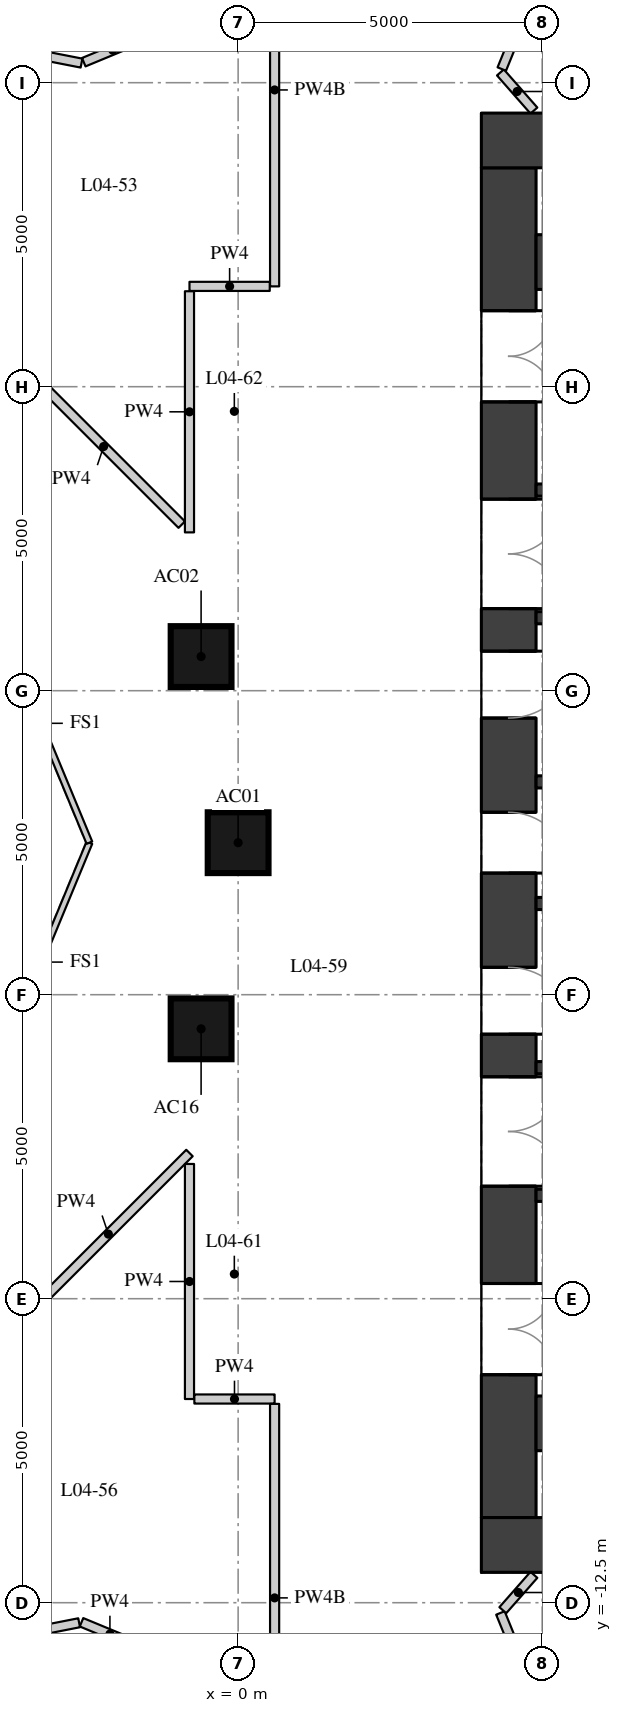
"""IFC4 building model, lengths in metres.
Left out: names, types, materials, properties, quantities, classifications, styles, units other than length and angle.
Written with IfcOpenShell. Run it as: python <this file> out.ifc"""

import sys

from ifc_helpers import new_model, si_unit, direction, frame, frame_2d, origin, origin_2d, place, context, subcontext, project, spatial, rectangle, extrude, element, fill, save


model = new_model("IFC4")
c1 = context("Model", 3, precision=1e-05, world=origin(), true_north=direction((0.0, 1.0)))
c2 = subcontext(c1, "Body", "Model", "MODEL_VIEW")
j1 = project(units=[si_unit("LENGTHUNIT", "METRE"), si_unit("PLANEANGLEUNIT", "RADIAN")], contexts=[c1])
p1 = place(None, origin())
s1 = spatial("IfcSite", under=j1, at=p1, CompositionType="ELEMENT")
p2 = place(p1, origin())
s2 = spatial("IfcBuilding", under=s1, at=p2, CompositionType="ELEMENT")
p3 = place(p2, frame((0.0, 0.0, 21.7)))
s3 = spatial("IfcBuildingStorey", under=s2, at=p3, CompositionType="ELEMENT", Elevation=21.7)
for number, where, z_axis, x_axis in (
    (1, (0.0, 0.0, 0.0), (0.0, 0.0, 1.0), (1.0, 0.0, 0.0)),
    (2, (-0.609, 3.062, 0.0), (0.0, 0.0, 1.0), (1.0, 0.0, 0.0)),
    (3, (-0.609, -3.062, 0.0), (0.0, 0.0, 1.0), (1.0, 0.0, 0.0)),
):
    element("IfcColumn", number, at=place(p3, frame(where, z_axis=z_axis, x_axis=x_axis)), inside=s3, PredefinedType="COLUMN", context=c2, shape_type="SweptSolid", body=[
        extrude(rectangle(XDim=1.0, YDim=1.0, at=origin_2d()), origin(), (0.0, 0.0, 1.0), 3.3),
    ])
p4 = place(p3, frame((4.45, -11.1, 0.0), z_axis=(0.0, 0.0, 1.0), x_axis=(0.0, 1.0, 0.0)))
e4 = element("IfcWall", 4, at=p4, inside=s3, PredefinedType="SHEAR", context=c2, shape_type="SweptSolid", body=[
    extrude(rectangle(XDim=22.2, YDim=0.9, at=frame_2d((11.1, 0.0))), origin(), (0.0, 0.0, 1.0), 3.02),
])
p5 = place(p4, frame((2.35, 0.0, 0.0)))
e5 = element("IfcOpeningElement", 5, at=p5, cuts=e4, PredefinedType="OPENING", context=c2, shape_type="SweptSolid", body=[
    extrude(rectangle(XDim=1.5, YDim=2.1, at=frame_2d((0.75, 1.05))), frame((0.0, 0.46, 0.0), z_axis=(0.0, -1.0, 0.0), x_axis=(1.0, 0.0, 0.0)), (0.0, 0.0, 1.0), 0.92),
])
p6 = place(p4, frame((5.45, 0.0, 0.0)))
e6 = element("IfcOpeningElement", 6, at=p6, cuts=e4, PredefinedType="OPENING", context=c2, shape_type="SweptSolid", body=[
    extrude(rectangle(XDim=1.8, YDim=2.1, at=frame_2d((0.9, 1.05))), frame((0.0, 0.46, 0.0), z_axis=(0.0, -1.0, 0.0), x_axis=(1.0, 0.0, 0.0)), (0.0, 0.0, 1.0), 0.92),
])
p7 = place(p4, frame((7.95, 0.0, 0.0)))
e7 = element("IfcOpeningElement", 7, at=p7, cuts=e4, PredefinedType="OPENING", context=c2, shape_type="SweptSolid", body=[
    extrude(rectangle(XDim=1.1, YDim=2.1, at=frame_2d((0.55, 1.05))), frame((0.0, 0.46, 0.0), z_axis=(0.0, -1.0, 0.0), x_axis=(1.0, 0.0, 0.0)), (0.0, 0.0, 1.0), 0.92),
])
p8 = place(p4, frame((10.6, 0.0, 0.0)))
e8 = element("IfcOpeningElement", 8, at=p8, cuts=e4, PredefinedType="OPENING", context=c2, shape_type="SweptSolid", body=[
    extrude(rectangle(XDim=1.0, YDim=2.1, at=frame_2d((0.5, 1.05))), frame((0.0, 0.46, 0.0), z_axis=(0.0, -1.0, 0.0), x_axis=(1.0, 0.0, 0.0)), (0.0, 0.0, 1.0), 0.92),
])
p9 = place(p4, frame((13.15, 0.0, 0.0)))
e9 = element("IfcOpeningElement", 9, at=p9, cuts=e4, PredefinedType="OPENING", context=c2, shape_type="SweptSolid", body=[
    extrude(rectangle(XDim=1.1, YDim=2.1, at=frame_2d((0.55, 1.05))), frame((0.0, 0.46, 0.0), z_axis=(0.0, -1.0, 0.0), x_axis=(1.0, 0.0, 0.0)), (0.0, 0.0, 1.0), 0.92),
])
p10 = place(p4, frame((14.95, 0.0, 0.0)))
e10 = element("IfcOpeningElement", 10, at=p10, cuts=e4, PredefinedType="OPENING", context=c2, shape_type="SweptSolid", body=[
    extrude(rectangle(XDim=1.8, YDim=2.1, at=frame_2d((0.9, 1.05))), frame((0.0, 0.46, 0.0), z_axis=(0.0, -1.0, 0.0), x_axis=(1.0, 0.0, 0.0)), (0.0, 0.0, 1.0), 0.92),
])
p11 = place(p4, frame((18.35, 0.0, 0.0)))
e11 = element("IfcOpeningElement", 11, at=p11, cuts=e4, PredefinedType="OPENING", context=c2, shape_type="SweptSolid", body=[
    extrude(rectangle(XDim=1.5, YDim=2.1, at=frame_2d((0.75, 1.05))), frame((0.0, 0.46, 0.0), z_axis=(0.0, -1.0, 0.0), x_axis=(1.0, 0.0, 0.0)), (0.0, 0.0, 1.0), 0.92),
])
for number, where, z_axis, x_axis in (
    (12, (4.0, 11.55, 0.0), (0.0, 0.0, 1.0), (1.0, 0.0, 0.0)),
    (13, (4.0, -11.55, 0.0), (0.0, 0.0, 1.0), (1.0, 0.0, 0.0)),
):
    element("IfcWall", number, at=place(p3, frame(where, z_axis=z_axis, x_axis=x_axis)), inside=s3, PredefinedType="SHEAR", context=c2, shape_type="SweptSolid", body=[
        extrude(rectangle(XDim=15.2, YDim=0.9, at=frame_2d((7.6, 0.0))), origin(), (0.0, 0.0, 1.0), 3.02),
    ])
for number, where, z_axis, x_axis in (
    (14, (4.9, 9.55, 0.0), (0.0, 0.0, 1.0), (1.0, 0.0, 0.0)),
    (15, (4.9, -9.55, 0.0), (0.0, 0.0, 1.0), (1.0, 0.0, 0.0)),
):
    element("IfcWall", number, at=place(p3, frame(where, z_axis=z_axis, x_axis=x_axis)), inside=s3, PredefinedType="SHEAR", context=c2, shape_type="SweptSolid", body=[
        extrude(rectangle(XDim=10.2, YDim=0.9, at=frame_2d((5.1, 0.0))), origin(), (0.0, 0.0, 1.0), 3.02),
    ])
p12 = place(p3, frame((4.9, 5.8, 0.0), z_axis=(0.0, 0.0, 1.0), x_axis=(1.0, 0.0, 0.0)))
e16 = element("IfcWall", 16, at=p12, inside=s3, PredefinedType="SHEAR", context=c2, shape_type="SweptSolid", body=[
    extrude(rectangle(XDim=10.2, YDim=0.2, at=frame_2d((5.1, 0.0))), origin(), (0.0, 0.0, 1.0), 3.02),
])
p13 = place(p12, frame((6.75, 0.0, 0.0)))
e17 = element("IfcOpeningElement", 17, at=p13, cuts=e16, PredefinedType="OPENING", context=c2, shape_type="SweptSolid", body=[
    extrude(rectangle(XDim=1.1, YDim=2.1, at=frame_2d((0.55, 1.05))), frame((0.0, 0.11, 0.0), z_axis=(0.0, -1.0, 0.0), x_axis=(1.0, 0.0, 0.0)), (0.0, 0.0, 1.0), 0.22),
])
p14 = place(p12, frame((8.75, 0.0, 0.0)))
e18 = element("IfcOpeningElement", 18, at=p14, cuts=e16, PredefinedType="OPENING", context=c2, shape_type="SweptSolid", body=[
    extrude(rectangle(XDim=1.1, YDim=2.1, at=frame_2d((0.55, 1.05))), frame((0.0, 0.11, 0.0), z_axis=(0.0, -1.0, 0.0), x_axis=(1.0, 0.0, 0.0)), (0.0, 0.0, 1.0), 0.22),
])
p15 = place(p3, frame((4.9, 3.7, 0.0), z_axis=(0.0, 0.0, 1.0), x_axis=(1.0, 0.0, 0.0)))
e19 = element("IfcWall", 19, at=p15, inside=s3, PredefinedType="SHEAR", context=c2, shape_type="SweptSolid", body=[
    extrude(rectangle(XDim=10.2, YDim=0.2, at=frame_2d((5.1, 0.0))), origin(), (0.0, 0.0, 1.0), 3.02),
])
p16 = place(p15, frame((6.3, 0.0, 0.0)))
e20 = element("IfcOpeningElement", 20, at=p16, cuts=e19, PredefinedType="OPENING", context=c2, shape_type="SweptSolid", body=[
    extrude(rectangle(XDim=1.1, YDim=2.1, at=frame_2d((0.55, 1.05))), frame((0.0, 0.11, 0.0), z_axis=(0.0, -1.0, 0.0), x_axis=(1.0, 0.0, 0.0)), (0.0, 0.0, 1.0), 0.22),
])
p17 = place(p15, frame((8.6, 0.0, 0.0)))
e21 = element("IfcOpeningElement", 21, at=p17, cuts=e19, PredefinedType="OPENING", context=c2, shape_type="SweptSolid", body=[
    extrude(rectangle(XDim=1.1, YDim=2.1, at=frame_2d((0.55, 1.05))), frame((0.0, 0.11, 0.0), z_axis=(0.0, -1.0, 0.0), x_axis=(1.0, 0.0, 0.0)), (0.0, 0.0, 1.0), 0.22),
])
for number, where, z_axis, x_axis in (
    (22, (4.9, 1.0, 0.0), (0.0, 0.0, 1.0), (1.0, 0.0, 0.0)),
    (23, (4.9, -1.0, 0.0), (0.0, 0.0, 1.0), (1.0, 0.0, 0.0)),
):
    element("IfcWall", number, at=place(p3, frame(where, z_axis=z_axis, x_axis=x_axis)), inside=s3, PredefinedType="SHEAR", context=c2, shape_type="SweptSolid", body=[
        extrude(rectangle(XDim=10.2, YDim=0.2, at=frame_2d((5.1, 0.0))), origin(), (0.0, 0.0, 1.0), 3.02),
    ])
p18 = place(p3, frame((4.9, -3.7, 0.0), z_axis=(0.0, 0.0, 1.0), x_axis=(1.0, 0.0, 0.0)))
e24 = element("IfcWall", 24, at=p18, inside=s3, PredefinedType="SHEAR", context=c2, shape_type="SweptSolid", body=[
    extrude(rectangle(XDim=10.2, YDim=0.2, at=frame_2d((5.1, 0.0))), origin(), (0.0, 0.0, 1.0), 3.02),
])
p19 = place(p18, frame((6.3, 0.0, 0.0)))
e25 = element("IfcOpeningElement", 25, at=p19, cuts=e24, PredefinedType="OPENING", context=c2, shape_type="SweptSolid", body=[
    extrude(rectangle(XDim=1.1, YDim=2.1, at=frame_2d((0.55, 1.05))), frame((0.0, 0.11, 0.0), z_axis=(0.0, -1.0, 0.0), x_axis=(1.0, 0.0, 0.0)), (0.0, 0.0, 1.0), 0.22),
])
p20 = place(p18, frame((8.6, 0.0, 0.0)))
e26 = element("IfcOpeningElement", 26, at=p20, cuts=e24, PredefinedType="OPENING", context=c2, shape_type="SweptSolid", body=[
    extrude(rectangle(XDim=1.1, YDim=2.1, at=frame_2d((0.55, 1.05))), frame((0.0, 0.11, 0.0), z_axis=(0.0, -1.0, 0.0), x_axis=(1.0, 0.0, 0.0)), (0.0, 0.0, 1.0), 0.22),
])
p21 = place(p3, frame((4.9, -5.8, 0.0), z_axis=(0.0, 0.0, 1.0), x_axis=(1.0, 0.0, 0.0)))
e27 = element("IfcWall", 27, at=p21, inside=s3, PredefinedType="SHEAR", context=c2, shape_type="SweptSolid", body=[
    extrude(rectangle(XDim=10.2, YDim=0.2, at=frame_2d((5.1, 0.0))), origin(), (0.0, 0.0, 1.0), 3.02),
])
p22 = place(p3, frame((0.6, 15.612, 0.0), z_axis=(0.0, 0.0, 1.0), x_axis=(0.0, -1.0, 0.0)))
e28 = element("IfcWall", 28, at=p22, inside=s3, PredefinedType="PARTITIONING", context=c2, shape_type="SweptSolid", body=[
    extrude(rectangle(XDim=6.462, YDim=0.15, at=frame_2d((3.231, 0.0))), origin(), (0.0, 0.0, 1.0), 2.47),
])
p23 = place(p3, frame((0.52, 9.15, 0.0), z_axis=(0.0, 0.0, 1.0), x_axis=(-1.0, 0.0, 0.0)))
e29 = element("IfcWall", 29, at=p23, inside=s3, PredefinedType="PARTITIONING", context=c2, shape_type="SweptSolid", body=[
    extrude(rectangle(XDim=1.32, YDim=0.15, at=frame_2d((0.66, 0.0))), origin(), (0.0, 0.0, 1.0), 3.02),
])
p24 = place(p3, frame((-0.8, 9.07, 0.0), z_axis=(0.0, 0.0, 1.0), x_axis=(0.0, -1.0, 0.0)))
e30 = element("IfcWall", 30, at=p24, inside=s3, PredefinedType="PARTITIONING", context=c2, shape_type="SweptSolid", body=[
    extrude(rectangle(XDim=3.966, YDim=0.15, at=frame_2d((1.983, 0.0))), origin(), (0.0, 0.0, 1.0), 3.02),
])
p25 = place(p3, frame((-0.927, 5.231, 0.0), z_axis=(0.0, 0.0, 1.0), x_axis=(-0.707106781187, 0.707106781187, 0.0)))
e31 = element("IfcWall", 31, at=p25, inside=s3, PredefinedType="PARTITIONING", context=c2, shape_type="SweptSolid", body=[
    extrude(rectangle(XDim=3.633, YDim=0.15, at=frame_2d((1.817, 0.0))), origin(), (0.0, 0.0, 1.0), 3.02),
])
p26 = place(p3, frame((-4.607, 13.22, 0.0), z_axis=(0.0, 0.0, 1.0), x_axis=(0.981304142817, -0.192463449234, 0.0)))
e32 = element("IfcWall", 32, at=p26, inside=s3, PredefinedType="PARTITIONING", context=c2, shape_type="SweptSolid", body=[
    extrude(rectangle(XDim=2.07, YDim=0.15, at=frame_2d((1.035, 0.0))), origin(), (0.0, 0.0, 1.0), 3.02),
])
p27 = place(p3, frame((-2.539, 12.837, 0.0), z_axis=(0.0, 0.0, 1.0), x_axis=(0.923768662954, 0.382950985565, 0.0)))
e33 = element("IfcWall", 33, at=p27, inside=s3, PredefinedType="PARTITIONING", context=c2, shape_type="SweptSolid", body=[
    extrude(rectangle(XDim=1.031, YDim=0.15, at=frame_2d((0.516, 0.0))), origin(), (0.0, 0.0, 1.0), 3.02),
])
p28 = place(p3, frame((4.865, 12.042, 0.0), z_axis=(0.0, 0.0, 1.0), x_axis=(-0.660014599896, 0.751252772323, 0.0)))
e34 = element("IfcWall", 34, at=p28, inside=s3, PredefinedType="PARTITIONING", context=c2, shape_type="SweptSolid", body=[
    extrude(rectangle(XDim=0.835, YDim=0.15, at=frame_2d((0.417, 0.0))), origin(), (0.0, 0.0, 1.0), 2.57),
])
p29 = place(p3, frame((4.336, 12.724, 0.0), z_axis=(0.0, 0.0, 1.0), x_axis=(0.376897652409, 0.926254910707, 0.0)))
e35 = element("IfcWall", 35, at=p29, inside=s3, PredefinedType="PARTITIONING", context=c2, shape_type="SweptSolid", body=[
    extrude(rectangle(XDim=1.962, YDim=0.15, at=frame_2d((0.981, 0.0))), origin(), (0.0, 0.0, 1.0), 3.02),
])
p30 = place(p3, frame((-1.641, -13.209, 0.0), z_axis=(0.0, 0.0, 1.0), x_axis=(-0.923725449546, 0.383055209937, 0.0)))
e36 = element("IfcWall", 36, at=p30, inside=s3, PredefinedType="PARTITIONING", context=c2, shape_type="SweptSolid", body=[
    extrude(rectangle(XDim=1.011, YDim=0.15, at=frame_2d((0.506, 0.0))), origin(), (0.0, 0.0, 1.0), 3.02),
])
p31 = place(p3, frame((-2.615, -12.83, 0.0), z_axis=(0.0, 0.0, 1.0), x_axis=(-0.981297312652, -0.192498270593, 0.0)))
e37 = element("IfcWall", 37, at=p31, inside=s3, PredefinedType="PARTITIONING", context=c2, shape_type="SweptSolid", body=[
    extrude(rectangle(XDim=2.09, YDim=0.15, at=frame_2d((1.045, 0.0))), origin(), (0.0, 0.0, 1.0), 3.02),
])
p32 = place(p3, frame((-3.468, -7.772, 0.0), z_axis=(0.0, 0.0, 1.0), x_axis=(0.707106781187, 0.707106781187, 0.0)))
e38 = element("IfcWall", 38, at=p32, inside=s3, PredefinedType="PARTITIONING", context=c2, shape_type="SweptSolid", body=[
    extrude(rectangle(XDim=3.773, YDim=0.15, at=frame_2d((1.887, 0.0))), origin(), (0.0, 0.0, 1.0), 3.02),
])
p33 = place(p3, frame((-0.8, -5.284, 0.0), z_axis=(0.0, 0.0, 1.0), x_axis=(0.0, -1.0, 0.0)))
e39 = element("IfcWall", 39, at=p33, inside=s3, PredefinedType="PARTITIONING", context=c2, shape_type="SweptSolid", body=[
    extrude(rectangle(XDim=3.866, YDim=0.15, at=frame_2d((1.933, 0.0))), origin(), (0.0, 0.0, 1.0), 3.02),
])
p34 = place(p3, frame((-0.72, -9.15, 0.0), z_axis=(0.0, 0.0, 1.0), x_axis=(1.0, 0.0, 0.0)))
e40 = element("IfcWall", 40, at=p34, inside=s3, PredefinedType="PARTITIONING", context=c2, shape_type="SweptSolid", body=[
    extrude(rectangle(XDim=1.32, YDim=0.15, at=frame_2d((0.66, 0.0))), origin(), (0.0, 0.0, 1.0), 3.02),
])
p35 = place(p3, frame((0.6, -9.23, 0.0), z_axis=(0.0, 0.0, 1.0), x_axis=(0.0, -1.0, 0.0)))
e41 = element("IfcWall", 41, at=p35, inside=s3, PredefinedType="PARTITIONING", context=c2, shape_type="SweptSolid", body=[
    extrude(rectangle(XDim=6.382, YDim=0.15, at=frame_2d((3.191, 0.0))), origin(), (0.0, 0.0, 1.0), 2.47),
])
p36 = place(p3, frame((5.045, -14.468, 0.0), z_axis=(0.0, 0.0, 1.0), x_axis=(-0.376889538578, 0.926258212223, 0.0)))
e42 = element("IfcWall", 42, at=p36, inside=s3, PredefinedType="PARTITIONING", context=c2, shape_type="SweptSolid", body=[
    extrude(rectangle(XDim=1.942, YDim=0.15, at=frame_2d((0.971, 0.0))), origin(), (0.0, 0.0, 1.0), 3.02),
])
p37 = place(p3, frame((4.353, -12.623, 0.0), z_axis=(0.0, 0.0, 1.0), x_axis=(0.660265480509, 0.751032286422, 0.0)))
e43 = element("IfcWall", 43, at=p37, inside=s3, PredefinedType="PARTITIONING", context=c2, shape_type="SweptSolid", body=[
    extrude(rectangle(XDim=0.775, YDim=0.15, at=frame_2d((0.387, 0.0))), origin(), (0.0, 0.0, 1.0), 2.57),
])
for number, where, z_axis, x_axis in (
    (44, (-2.446, 0.0, 0.0), (0.0, 0.0, 1.0), (-0.383, -0.924, 0.0)),
    (45, (-4.073, 3.927, 0.0), (0.0, 0.0, 1.0), (0.383, -0.924, 0.0)),
):
    element("IfcWall", number, at=place(p3, frame(where, z_axis=z_axis, x_axis=x_axis)), inside=s3, PredefinedType="PARTITIONING", context=c2, shape_type="SweptSolid", body=[
        extrude(rectangle(XDim=4.251, YDim=0.1, at=frame_2d((2.125, 0.0))), origin(), (0.0, 0.0, 1.0), 3.02),
    ])
p38 = place(p5, origin())
e46 = element("IfcDoor", 46, at=p38, inside=s3, OperationType="DOUBLE_DOOR_SINGLE_SWING", PredefinedType="DOOR", context=c2, shape_type="SweptSolid", body=[
    extrude(rectangle(XDim=1.5, YDim=2.1, at=frame_2d((0.75, 1.05))), frame((0.0, 0.025, 0.0), z_axis=(0.0, -1.0, 0.0), x_axis=(1.0, 0.0, 0.0)), (0.0, 0.0, 1.0), 0.05),
])
fill(e5, e46)
p39 = place(p6, origin())
e47 = element("IfcDoor", 47, at=p39, inside=s3, OperationType="DOUBLE_DOOR_SINGLE_SWING", PredefinedType="DOOR", context=c2, shape_type="SweptSolid", body=[
    extrude(rectangle(XDim=1.8, YDim=2.1, at=frame_2d((0.9, 1.05))), frame((0.0, 0.025, 0.0), z_axis=(0.0, -1.0, 0.0), x_axis=(1.0, 0.0, 0.0)), (0.0, 0.0, 1.0), 0.05),
])
fill(e6, e47)
p40 = place(p7, origin())
e48 = element("IfcDoor", 48, at=p40, inside=s3, OperationType="SINGLE_SWING_RIGHT", PredefinedType="DOOR", context=c2, shape_type="SweptSolid", body=[
    extrude(rectangle(XDim=1.1, YDim=2.1, at=frame_2d((0.55, 1.05))), frame((0.0, 0.025, 0.0), z_axis=(0.0, -1.0, 0.0), x_axis=(1.0, 0.0, 0.0)), (0.0, 0.0, 1.0), 0.05),
])
fill(e7, e48)
p41 = place(p8, origin())
e49 = element("IfcDoor", 49, at=p41, inside=s3, OperationType="SINGLE_SWING_RIGHT", PredefinedType="DOOR", context=c2, shape_type="SweptSolid", body=[
    extrude(rectangle(XDim=1.0, YDim=2.1, at=frame_2d((0.5, 1.05))), frame((0.0, 0.025, 0.0), z_axis=(0.0, -1.0, 0.0), x_axis=(1.0, 0.0, 0.0)), (0.0, 0.0, 1.0), 0.05),
])
fill(e8, e49)
p42 = place(p9, origin())
e50 = element("IfcDoor", 50, at=p42, inside=s3, OperationType="SINGLE_SWING_LEFT", PredefinedType="DOOR", context=c2, shape_type="SweptSolid", body=[
    extrude(rectangle(XDim=1.1, YDim=2.1, at=frame_2d((0.55, 1.05))), frame((0.0, 0.025, 0.0), z_axis=(0.0, -1.0, 0.0), x_axis=(1.0, 0.0, 0.0)), (0.0, 0.0, 1.0), 0.05),
])
fill(e9, e50)
p43 = place(p10, origin())
e51 = element("IfcDoor", 51, at=p43, inside=s3, OperationType="DOUBLE_DOOR_SINGLE_SWING", PredefinedType="DOOR", context=c2, shape_type="SweptSolid", body=[
    extrude(rectangle(XDim=1.8, YDim=2.1, at=frame_2d((0.9, 1.05))), frame((0.0, 0.025, 0.0), z_axis=(0.0, -1.0, 0.0), x_axis=(1.0, 0.0, 0.0)), (0.0, 0.0, 1.0), 0.05),
])
fill(e10, e51)
p44 = place(p11, origin())
e52 = element("IfcDoor", 52, at=p44, inside=s3, OperationType="DOUBLE_DOOR_SINGLE_SWING", PredefinedType="DOOR", context=c2, shape_type="SweptSolid", body=[
    extrude(rectangle(XDim=1.5, YDim=2.1, at=frame_2d((0.75, 1.05))), frame((0.0, 0.025, 0.0), z_axis=(0.0, -1.0, 0.0), x_axis=(1.0, 0.0, 0.0)), (0.0, 0.0, 1.0), 0.05),
])
fill(e11, e52)
save(model, sys.argv[1])
